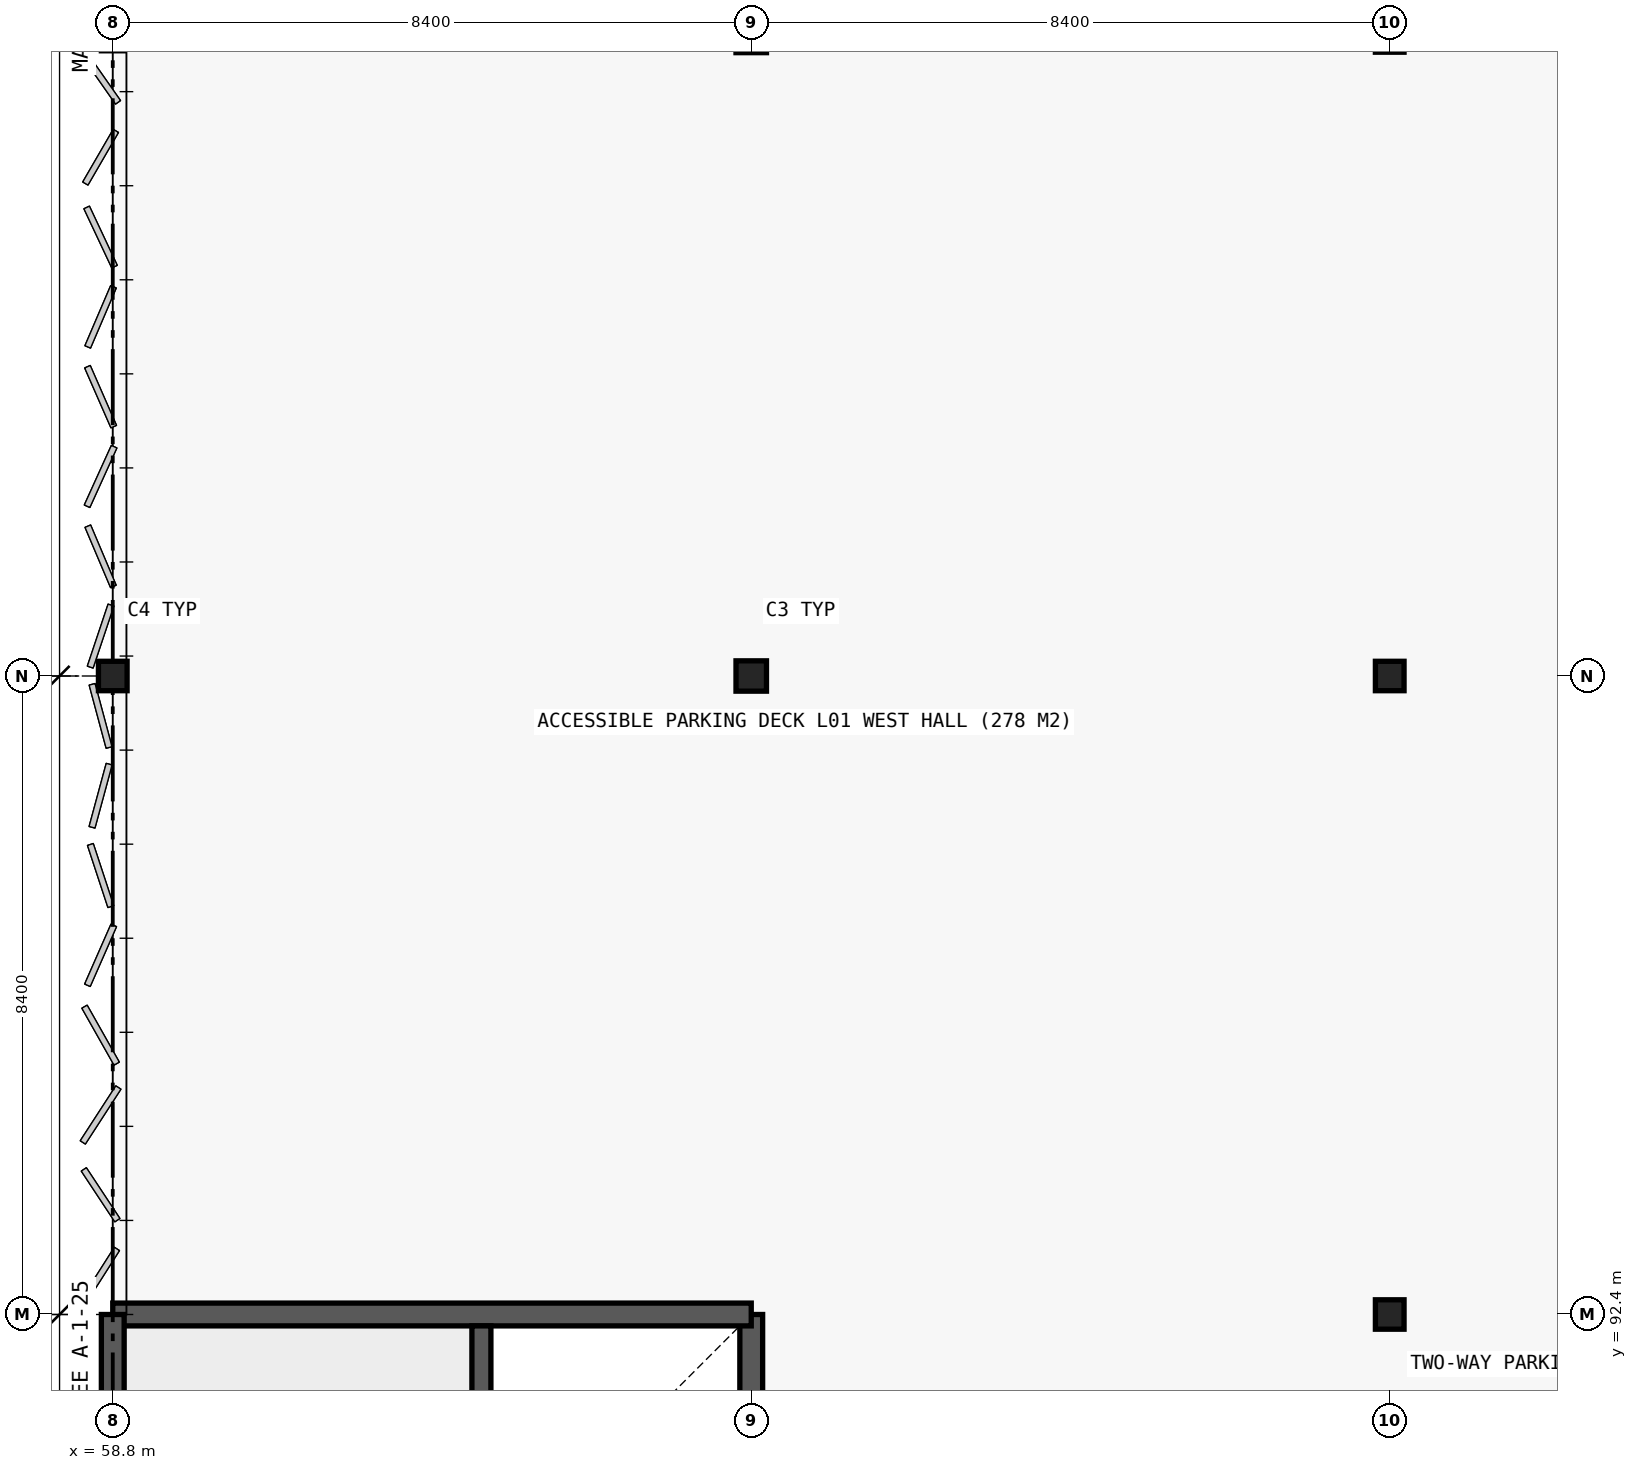
"""IFC4 building model, lengths in metres.
Left out: names, types, materials, properties, quantities, classifications, styles, units other than length and angle.
Written with IfcOpenShell. Run it as: python <this file> out.ifc"""

import sys

from ifc_helpers import new_model, si_unit, direction, frame, frame_2d, origin, origin_2d, place, context, subcontext, project, spatial, rectangle, i_section, extrude, element, save


model = new_model("IFC4")
c1 = context("Model", 3, precision=1e-05, world=origin(), true_north=direction((0.0, 1.0)))
c2 = subcontext(c1, "Body", "Model", "MODEL_VIEW")
j1 = project(units=[si_unit("LENGTHUNIT", "METRE"), si_unit("PLANEANGLEUNIT", "RADIAN")], contexts=[c1])
p1 = place(None, origin())
s1 = spatial("IfcSite", under=j1, at=p1, CompositionType="ELEMENT")
p2 = place(p1, origin())
s2 = spatial("IfcBuilding", under=s1, at=p2, CompositionType="ELEMENT")
p3 = place(p2, frame((0.0, 0.0, 4.8)))
s3 = spatial("IfcBuildingStorey", under=s2, at=p3, CompositionType="ELEMENT", Elevation=4.8)
p4 = place(p3, frame((67.2, 84.0, 0.0), z_axis=(0.0, 0.0, 1.0), x_axis=(0.0, 1.0, 0.0)))
e1 = element("IfcWall", 1, at=p4, inside=s3, PredefinedType="SHEAR", context=c2, shape_type="SweptSolid", body=[
    extrude(rectangle(XDim=8.4, YDim=0.3, at=frame_2d((4.2, 0.0))), origin(), (0.0, 0.0, 1.0), 4.2),
])
p5 = place(p4, frame((4.55, 0.0, 0.0)))
e2 = element("IfcOpeningElement", 2, at=p5, cuts=e1, PredefinedType="OPENING", context=c2, shape_type="SweptSolid", body=[
    extrude(rectangle(XDim=1.1, YDim=2.2, at=frame_2d((0.55, 1.1))), frame((0.0, 0.16, 0.0), z_axis=(0.0, -1.0, 0.0), x_axis=(1.0, 0.0, 0.0)), (0.0, 0.0, 1.0), 0.32),
])
for number, where, z_axis, x_axis in (
    (3, (67.2, 92.4, 0.0), (0.0, 0.0, 1.0), (-1.0, 0.0, 0.0)),
    (4, (58.8, 92.4, 0.0), (0.0, 0.0, 1.0), (0.0, -1.0, 0.0)),
):
    element("IfcWall", number, at=place(p3, frame(where, z_axis=z_axis, x_axis=x_axis)), inside=s3, PredefinedType="SHEAR", context=c2, shape_type="SweptSolid", body=[
        extrude(rectangle(XDim=8.4, YDim=0.3, at=frame_2d((4.2, 0.0))), origin(), (0.0, 0.0, 1.0), 4.2),
    ])
p6 = place(p3, frame((63.65, 84.15, 0.0), z_axis=(0.0, 0.0, 1.0), x_axis=(0.0, 1.0, 0.0)))
e5 = element("IfcWall", 5, at=p6, inside=s3, PredefinedType="SHEAR", context=c2, shape_type="SweptSolid", body=[
    extrude(rectangle(XDim=8.1, YDim=0.25, at=frame_2d((4.05, 0.0))), origin(), (0.0, 0.0, 1.0), 4.2),
])
p7 = place(p3, frame((58.8, 100.8, 0.0), z_axis=(0.0, 0.0, 1.0), x_axis=(1.0, 0.0, 0.0)))
e6 = element("IfcColumn", 6, at=p7, inside=s3, PredefinedType="COLUMN", context=c2, shape_type="SweptSolid", body=[
    extrude(i_section(OverallWidth=0.377, OverallDepth=0.387, WebThickness=0.022, FlangeThickness=0.036, FilletRadius=0.015, at=origin_2d()), origin(), (0.0, 0.0, 1.0), 4.2),
])
p8 = place(p3, frame((67.2, 100.8, 0.0), z_axis=(0.0, 0.0, 1.0), x_axis=(1.0, 0.0, 0.0)))
e7 = element("IfcColumn", 7, at=p8, inside=s3, PredefinedType="COLUMN", context=c2, shape_type="SweptSolid", body=[
    extrude(i_section(OverallWidth=0.401, OverallDepth=0.399, WebThickness=0.025, FlangeThickness=0.04, FilletRadius=0.015, at=origin_2d()), origin(), (0.0, 0.0, 1.0), 4.2),
])
for number, where, z_axis, x_axis in (
    (8, (75.6, 92.4, 0.0), (0.0, 0.0, 1.0), (1.0, 0.0, 0.0)),
    (9, (75.6, 100.8, 0.0), (0.0, 0.0, 1.0), (1.0, 0.0, 0.0)),
):
    element("IfcColumn", number, at=place(p3, frame(where, z_axis=z_axis, x_axis=x_axis)), inside=s3, PredefinedType="COLUMN", context=c2, shape_type="SweptSolid", body=[
        extrude(i_section(OverallWidth=0.377, OverallDepth=0.387, WebThickness=0.022, FlangeThickness=0.036, FilletRadius=0.015, at=origin_2d()), origin(), (0.0, 0.0, 1.0), 4.2),
    ])
save(model, sys.argv[1])
